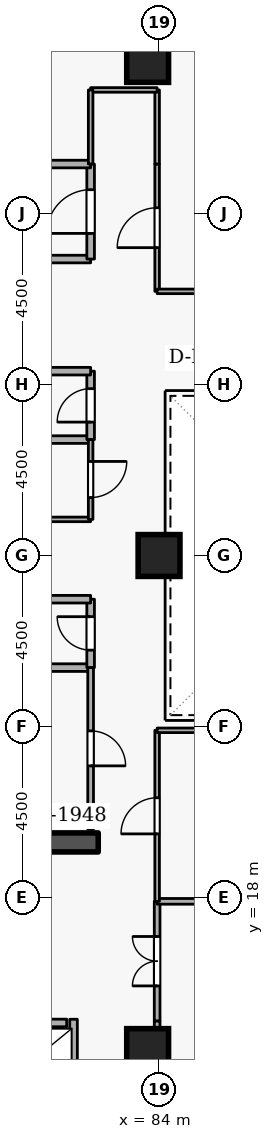
"""IFC4 building model, lengths in metres.
Left out: names, types, materials, properties, quantities, classifications, styles, units other than length and angle.
Written with IfcOpenShell. Run it as: python <this file> out.ifc"""

import sys

from ifc_helpers import new_model, si_unit, direction, frame, frame_2d, origin, origin_2d, place, context, subcontext, project, spatial, rectangle, extrude, element, fill, save


model = new_model("IFC4")
c1 = context("Model", 3, precision=1e-05, world=origin(), true_north=direction((0.0, 1.0)))
c2 = subcontext(c1, "Body", "Model", "MODEL_VIEW")
j1 = project(units=[si_unit("LENGTHUNIT", "METRE"), si_unit("PLANEANGLEUNIT", "RADIAN")], contexts=[c1])
p1 = place(None, origin())
s1 = spatial("IfcSite", under=j1, at=p1, CompositionType="ELEMENT")
p2 = place(p1, origin())
s2 = spatial("IfcBuilding", under=s1, at=p2, CompositionType="ELEMENT")
p3 = place(p2, frame((0.0, 0.0, 163.5)))
s3 = spatial("IfcBuildingStorey", under=s2, at=p3, CompositionType="ELEMENT", Elevation=163.5)
p4 = place(p3, frame((76.6, 19.45, 0.0), z_axis=(0.0, 0.0, 1.0), x_axis=(1.0, 0.0, 0.0)))
e1 = element("IfcWall", 1, at=p4, inside=s3, PredefinedType="SHEAR", context=c2, shape_type="SweptSolid", body=[
    extrude(rectangle(XDim=5.8, YDim=0.5, at=frame_2d((2.9, 0.0))), origin(), (0.0, 0.0, 1.0), 3.6),
])
for number, where, z_axis, x_axis in (
    (2, (83.7, 14.0, 0.0), (0.0, 0.0, 1.0), (1.0, 0.0, 0.0)),
    (3, (83.7, 40.0, 0.0), (0.0, 0.0, 1.0), (1.0, 0.0, 0.0)),
    (4, (84.0, 27.0, 0.0), (0.0, 0.0, 1.0), (1.0, 0.0, 0.0)),
):
    element("IfcColumn", number, at=place(p3, frame(where, z_axis=z_axis, x_axis=x_axis)), inside=s3, PredefinedType="COLUMN", context=c2, shape_type="SweptSolid", body=[
        extrude(rectangle(XDim=1.1, YDim=1.1, at=origin_2d()), origin(), (0.0, 0.0, 1.0), 3.6),
    ])
p5 = place(p3, frame((79.63, 14.7, 0.0), z_axis=(0.0, 0.0, 1.0), x_axis=(1.0, 0.0, 0.0)))
e5 = element("IfcWall", 5, at=p5, inside=s3, PredefinedType="STANDARD", context=c2, shape_type="SweptSolid", body=[
    extrude(rectangle(XDim=1.94, YDim=0.2, at=frame_2d((0.97, 0.0))), origin(), (0.0, 0.0, 1.0), 3.34),
])
p6 = place(p5, frame((0.46, 0.0, 0.0)))
e6 = element("IfcOpeningElement", 6, at=p6, cuts=e5, PredefinedType="OPENING", context=c2, shape_type="SweptSolid", body=[
    extrude(rectangle(XDim=1.02, YDim=2.06, at=frame_2d((0.51, 1.03))), frame((0.0, 0.11, 0.0), z_axis=(0.0, -1.0, 0.0), x_axis=(1.0, 0.0, 0.0)), (0.0, 0.0, 1.0), 0.22),
])
p7 = place(p3, frame((81.75, 12.612, 0.0), z_axis=(0.0, 0.0, 1.0), x_axis=(0.0, 1.0, 0.0)))
e7 = element("IfcWall", 7, at=p7, inside=s3, PredefinedType="STANDARD", context=c2, shape_type="SweptSolid", body=[
    extrude(rectangle(XDim=2.186, YDim=0.2, at=frame_2d((1.093, 0.0))), origin(), (0.0, 0.0, 1.0), 3.34),
])
p8 = place(p3, frame((79.9, 34.8, 0.0), z_axis=(0.0, 0.0, 1.0), x_axis=(1.0, 0.0, 0.0)))
e8 = element("IfcWall", 8, at=p8, inside=s3, PredefinedType="STANDARD", context=c2, shape_type="SweptSolid", body=[
    extrude(rectangle(XDim=2.3, YDim=0.2, at=frame_2d((1.15, 0.0))), origin(), (0.0, 0.0, 1.0), 2.545),
])
p9 = place(p3, frame((82.2, 34.8, 0.0), z_axis=(0.0, 0.0, 1.0), x_axis=(0.0, 1.0, 0.0)))
e9 = element("IfcWall", 9, at=p9, inside=s3, PredefinedType="STANDARD", context=c2, shape_type="SweptSolid", body=[
    extrude(rectangle(XDim=2.5, YDim=0.2, at=frame_2d((1.25, 0.0))), origin(), (0.0, 0.0, 1.0), 3.34),
])
p10 = place(p9, frame((0.675, 0.0, 0.0)))
e10 = element("IfcOpeningElement", 10, at=p10, cuts=e9, PredefinedType="OPENING", context=c2, shape_type="SweptSolid", body=[
    extrude(rectangle(XDim=1.15, YDim=2.1, at=frame_2d((0.575, 1.05))), frame((0.0, 0.11, 0.0), z_axis=(0.0, -1.0, 0.0), x_axis=(1.0, 0.0, 0.0)), (0.0, 0.0, 1.0), 0.22),
])
p11 = place(p3, frame((82.2, 37.3, 0.0), z_axis=(0.0, 0.0, 1.0), x_axis=(-1.0, 0.0, 0.0)))
e11 = element("IfcWall", 11, at=p11, inside=s3, PredefinedType="STANDARD", context=c2, shape_type="SweptSolid", body=[
    extrude(rectangle(XDim=5.7, YDim=0.2, at=frame_2d((2.85, 0.0))), origin(), (0.0, 0.0, 1.0), 3.34),
])
p12 = place(p3, frame((80.15, 24.05, 0.0), z_axis=(0.0, 0.0, 1.0), x_axis=(1.0, 0.0, 0.0)))
e12 = element("IfcWall", 12, at=p12, inside=s3, PredefinedType="STANDARD", context=c2, shape_type="SweptSolid", body=[
    extrude(rectangle(XDim=2.05, YDim=0.2, at=frame_2d((1.025, 0.0))), origin(), (0.0, 0.0, 1.0), 3.34),
])
p13 = place(p3, frame((82.2, 24.05, 0.0), z_axis=(0.0, 0.0, 1.0), x_axis=(0.0, 1.0, 0.0)))
e13 = element("IfcWall", 13, at=p13, inside=s3, PredefinedType="STANDARD", context=c2, shape_type="SweptSolid", body=[
    extrude(rectangle(XDim=1.8, YDim=0.2, at=frame_2d((0.9, 0.0))), origin(), (0.0, 0.0, 1.0), 3.34),
])
p14 = place(p13, frame((0.46, 0.0, 0.0)))
e14 = element("IfcOpeningElement", 14, at=p14, cuts=e13, PredefinedType="OPENING", context=c2, shape_type="SweptSolid", body=[
    extrude(rectangle(XDim=0.88, YDim=2.04, at=frame_2d((0.44, 1.02))), frame((0.0, 0.11, 0.0), z_axis=(0.0, -1.0, 0.0), x_axis=(1.0, 0.0, 0.0)), (0.0, 0.0, 1.0), 0.22),
])
for number, where, z_axis, x_axis in (
    (15, (82.2, 25.85, 0.0), (0.0, 0.0, 1.0), (-1.0, 0.0, 0.0)),
    (16, (80.15, 30.05, 0.0), (0.0, 0.0, 1.0), (1.0, 0.0, 0.0)),
):
    element("IfcWall", number, at=place(p3, frame(where, z_axis=z_axis, x_axis=x_axis)), inside=s3, PredefinedType="STANDARD", context=c2, shape_type="SweptSolid", body=[
        extrude(rectangle(XDim=2.05, YDim=0.2, at=frame_2d((1.025, 0.0))), origin(), (0.0, 0.0, 1.0), 3.34),
    ])
p15 = place(p3, frame((82.2, 30.05, 0.0), z_axis=(0.0, 0.0, 1.0), x_axis=(0.0, 1.0, 0.0)))
e17 = element("IfcWall", 17, at=p15, inside=s3, PredefinedType="STANDARD", context=c2, shape_type="SweptSolid", body=[
    extrude(rectangle(XDim=1.8, YDim=0.2, at=frame_2d((0.9, 0.0))), origin(), (0.0, 0.0, 1.0), 3.34),
])
p16 = place(p15, frame((0.46, 0.0, 0.0)))
e18 = element("IfcOpeningElement", 18, at=p16, cuts=e17, PredefinedType="OPENING", context=c2, shape_type="SweptSolid", body=[
    extrude(rectangle(XDim=0.88, YDim=2.04, at=frame_2d((0.44, 1.02))), frame((0.0, 0.11, 0.0), z_axis=(0.0, -1.0, 0.0), x_axis=(1.0, 0.0, 0.0)), (0.0, 0.0, 1.0), 0.22),
])
p17 = place(p3, frame((82.2, 31.85, 0.0), z_axis=(0.0, 0.0, 1.0), x_axis=(-1.0, 0.0, 0.0)))
e19 = element("IfcWall", 19, at=p17, inside=s3, PredefinedType="STANDARD", context=c2, shape_type="SweptSolid", body=[
    extrude(rectangle(XDim=2.05, YDim=0.2, at=frame_2d((1.025, 0.0))), origin(), (0.0, 0.0, 1.0), 3.34),
])
p18 = place(p3, frame((82.2, 24.05, 0.0), z_axis=(0.0, 0.0, 1.0), x_axis=(0.0, -1.0, 0.0)))
e20 = element("IfcWall", 20, at=p18, inside=s3, PredefinedType="PARTITIONING", context=c2, shape_type="SweptSolid", body=[
    extrude(rectangle(XDim=4.25, YDim=0.15, at=frame_2d((2.125, 0.0))), origin(), (0.0, 0.0, 1.0), 3.34),
])
p19 = place(p18, frame((1.665, 0.0, 0.0)))
e21 = element("IfcOpeningElement", 21, at=p19, cuts=e20, PredefinedType="OPENING", context=c2, shape_type="SweptSolid", body=[
    extrude(rectangle(XDim=0.92, YDim=2.08, at=frame_2d((0.46, 1.04))), frame((0.0, 0.085, 0.0), z_axis=(0.0, -1.0, 0.0), x_axis=(1.0, 0.0, 0.0)), (0.0, 0.0, 1.0), 0.17),
])
p20 = place(p3, frame((82.2, 27.95, 0.0), z_axis=(0.0, 0.0, 1.0), x_axis=(-1.0, 0.0, 0.0)))
e22 = element("IfcWall", 22, at=p20, inside=s3, PredefinedType="PARTITIONING", context=c2, shape_type="SweptSolid", body=[
    extrude(rectangle(XDim=2.05, YDim=0.12, at=frame_2d((1.025, 0.0))), origin(), (0.0, 0.0, 1.0), 3.34),
])
p21 = place(p3, frame((82.2, 30.05, 0.0), z_axis=(0.0, 0.0, 1.0), x_axis=(0.0, -1.0, 0.0)))
e23 = element("IfcWall", 23, at=p21, inside=s3, PredefinedType="PARTITIONING", context=c2, shape_type="SweptSolid", body=[
    extrude(rectangle(XDim=2.1, YDim=0.12, at=frame_2d((1.05, 0.0))), origin(), (0.0, 0.0, 1.0), 3.34),
])
p22 = place(p21, frame((0.575, 0.0, 0.0)))
e24 = element("IfcOpeningElement", 24, at=p22, cuts=e23, PredefinedType="OPENING", context=c2, shape_type="SweptSolid", body=[
    extrude(rectangle(XDim=0.95, YDim=2.1, at=frame_2d((0.475, 1.05))), frame((0.0, 0.07, 0.0), z_axis=(0.0, -1.0, 0.0), x_axis=(1.0, 0.0, 0.0)), (0.0, 0.0, 1.0), 0.14),
])
p23 = place(p3, frame((83.95, 14.75, 0.0), z_axis=(0.0, 0.0, 1.0), x_axis=(0.0, 1.0, 0.0)))
e25 = element("IfcWall", 25, at=p23, inside=s3, PredefinedType="PARTITIONING", context=c2, shape_type="SweptSolid", body=[
    extrude(rectangle(XDim=3.15, YDim=0.15, at=frame_2d((1.575, 0.0))), origin(), (0.0, 0.0, 1.0), 3.34),
])
p24 = place(p23, frame((0.925, 0.0, 0.0)))
e26 = element("IfcOpeningElement", 26, at=p24, cuts=e25, PredefinedType="OPENING", context=c2, shape_type="SweptSolid", body=[
    extrude(rectangle(XDim=1.3, YDim=2.12, at=frame_2d((0.65, 1.06))), frame((0.0, 0.085, 0.0), z_axis=(0.0, -1.0, 0.0), x_axis=(1.0, 0.0, 0.0)), (0.0, 0.0, 1.0), 0.17),
])
p25 = place(p3, frame((83.95, 17.9, 0.0), z_axis=(0.0, 0.0, 1.0), x_axis=(1.0, 0.0, 0.0)))
e27 = element("IfcWall", 27, at=p25, inside=s3, PredefinedType="PARTITIONING", context=c2, shape_type="SweptSolid", body=[
    extrude(rectangle(XDim=4.55, YDim=0.15, at=frame_2d((2.275, 0.0))), origin(), (0.0, 0.0, 1.0), 3.34),
])
p26 = place(p3, frame((83.95, 12.4, 0.0), z_axis=(0.0, 0.0, 1.0), x_axis=(0.0, 1.0, 0.0)))
e28 = element("IfcWall", 28, at=p26, inside=s3, PredefinedType="PARTITIONING", context=c2, shape_type="SweptSolid", body=[
    extrude(rectangle(XDim=2.35, YDim=0.15, at=frame_2d((1.175, 0.0))), origin(), (0.0, 0.0, 1.0), 3.34),
])
p27 = place(p3, frame((83.95, 17.9, 0.0), z_axis=(0.0, 0.0, 1.0), x_axis=(0.0, 1.0, 0.0)))
e29 = element("IfcWall", 29, at=p27, inside=s3, PredefinedType="PARTITIONING", context=c2, shape_type="SweptSolid", body=[
    extrude(rectangle(XDim=4.5, YDim=0.12, at=frame_2d((2.25, 0.0))), origin(), (0.0, 0.0, 1.0), 3.34),
])
p28 = place(p27, frame((1.775, 0.0, 0.0)))
e30 = element("IfcOpeningElement", 30, at=p28, cuts=e29, PredefinedType="OPENING", context=c2, shape_type="SweptSolid", body=[
    extrude(rectangle(XDim=0.95, YDim=2.1, at=frame_2d((0.475, 1.05))), frame((0.0, 0.07, 0.0), z_axis=(0.0, -1.0, 0.0), x_axis=(1.0, 0.0, 0.0)), (0.0, 0.0, 1.0), 0.14),
])
p29 = place(p3, frame((83.95, 22.4, 0.0), z_axis=(0.0, 0.0, 1.0), x_axis=(1.0, 0.0, 0.0)))
e31 = element("IfcWall", 31, at=p29, inside=s3, PredefinedType="PARTITIONING", context=c2, shape_type="SweptSolid", body=[
    extrude(rectangle(XDim=9.1, YDim=0.12, at=frame_2d((4.55, 0.0))), origin(), (0.0, 0.0, 1.0), 3.34),
])
p30 = place(p3, frame((83.95, 33.95, 0.0), z_axis=(0.0, 0.0, 1.0), x_axis=(0.0, 1.0, 0.0)))
e32 = element("IfcWall", 32, at=p30, inside=s3, PredefinedType="PARTITIONING", context=c2, shape_type="SweptSolid", body=[
    extrude(rectangle(XDim=3.35, YDim=0.12, at=frame_2d((1.675, 0.0))), origin(), (0.0, 0.0, 1.0), 3.34),
])
p31 = place(p30, frame((1.15, 0.0, 0.0)))
e33 = element("IfcOpeningElement", 33, at=p31, cuts=e32, PredefinedType="OPENING", context=c2, shape_type="SweptSolid", body=[
    extrude(rectangle(XDim=1.05, YDim=2.1, at=frame_2d((0.525, 1.05))), frame((0.0, 0.07, 0.0), z_axis=(0.0, -1.0, 0.0), x_axis=(1.0, 0.0, 0.0)), (0.0, 0.0, 1.0), 0.14),
])
p32 = place(p3, frame((83.95, 37.3, 0.0), z_axis=(0.0, 0.0, 1.0), x_axis=(0.0, 1.0, 0.0)))
e34 = element("IfcWall", 34, at=p32, inside=s3, PredefinedType="PARTITIONING", context=c2, shape_type="SweptSolid", body=[
    extrude(rectangle(XDim=1.95, YDim=0.12, at=frame_2d((0.975, 0.0))), origin(), (0.0, 0.0, 1.0), 3.34),
])
p33 = place(p3, frame((83.95, 39.25, 0.0), z_axis=(0.0, 0.0, 1.0), x_axis=(-1.0, 0.0, 0.0)))
e35 = element("IfcWall", 35, at=p33, inside=s3, PredefinedType="PARTITIONING", context=c2, shape_type="SweptSolid", body=[
    extrude(rectangle(XDim=1.75, YDim=0.12, at=frame_2d((0.875, 0.0))), origin(), (0.0, 0.0, 1.0), 3.34),
])
p34 = place(p3, frame((82.2, 39.25, 0.0), z_axis=(0.0, 0.0, 1.0), x_axis=(0.0, -1.0, 0.0)))
e36 = element("IfcWall", 36, at=p34, inside=s3, PredefinedType="PARTITIONING", context=c2, shape_type="SweptSolid", body=[
    extrude(rectangle(XDim=1.95, YDim=0.12, at=frame_2d((0.975, 0.0))), origin(), (0.0, 0.0, 1.0), 3.34),
])
p35 = place(p3, frame((86.25, 33.95, 0.0), z_axis=(0.0, 0.0, 1.0), x_axis=(-1.0, 0.0, 0.0)))
e37 = element("IfcWall", 37, at=p35, inside=s3, PredefinedType="PARTITIONING", context=c2, shape_type="SweptSolid", body=[
    extrude(rectangle(XDim=2.3, YDim=0.12, at=frame_2d((1.15, 0.0))), origin(), (0.0, 0.0, 1.0), 3.34),
])
p36 = place(p10, origin())
e38 = element("IfcDoor", 38, at=p36, inside=s3, OperationType="SINGLE_SWING_LEFT", PredefinedType="DOOR", context=c2, shape_type="SweptSolid", body=[
    extrude(rectangle(XDim=1.15, YDim=2.1, at=frame_2d((0.575, 1.05))), frame((0.0, 0.025, 0.0), z_axis=(0.0, -1.0, 0.0), x_axis=(1.0, 0.0, 0.0)), (0.0, 0.0, 1.0), 0.05),
])
fill(e10, e38)
p37 = place(p14, origin())
e39 = element("IfcDoor", 39, at=p37, inside=s3, OperationType="SINGLE_SWING_RIGHT", PredefinedType="DOOR", context=c2, shape_type="SweptSolid", body=[
    extrude(rectangle(XDim=0.88, YDim=2.04, at=frame_2d((0.44, 1.02))), frame((0.0, 0.025, 0.0), z_axis=(0.0, -1.0, 0.0), x_axis=(1.0, 0.0, 0.0)), (0.0, 0.0, 1.0), 0.05),
])
fill(e14, e39)
p38 = place(p16, origin())
e40 = element("IfcDoor", 40, at=p38, inside=s3, OperationType="SINGLE_SWING_LEFT", PredefinedType="DOOR", context=c2, shape_type="SweptSolid", body=[
    extrude(rectangle(XDim=0.88, YDim=2.04, at=frame_2d((0.44, 1.02))), frame((0.0, 0.025, 0.0), z_axis=(0.0, -1.0, 0.0), x_axis=(1.0, 0.0, 0.0)), (0.0, 0.0, 1.0), 0.05),
])
fill(e18, e40)
p39 = place(p19, origin())
e41 = element("IfcDoor", 41, at=p39, inside=s3, OperationType="SINGLE_SWING_RIGHT", PredefinedType="DOOR", context=c2, shape_type="SweptSolid", body=[
    extrude(rectangle(XDim=0.92, YDim=2.08, at=frame_2d((0.46, 1.04))), frame((0.0, 0.025, 0.0), z_axis=(0.0, -1.0, 0.0), x_axis=(1.0, 0.0, 0.0)), (0.0, 0.0, 1.0), 0.05),
])
fill(e21, e41)
p40 = place(p22, origin())
e42 = element("IfcDoor", 42, at=p40, inside=s3, OperationType="SINGLE_SWING_LEFT", PredefinedType="DOOR", context=c2, shape_type="SweptSolid", body=[
    extrude(rectangle(XDim=0.95, YDim=2.1, at=frame_2d((0.475, 1.05))), frame((0.0, 0.025, 0.0), z_axis=(0.0, -1.0, 0.0), x_axis=(1.0, 0.0, 0.0)), (0.0, 0.0, 1.0), 0.05),
])
fill(e24, e42)
p41 = place(p24, origin())
e43 = element("IfcDoor", 43, at=p41, inside=s3, OperationType="DOUBLE_DOOR_SINGLE_SWING", PredefinedType="DOOR", context=c2, shape_type="SweptSolid", body=[
    extrude(rectangle(XDim=1.3, YDim=2.12, at=frame_2d((0.65, 1.06))), frame((0.0, 0.025, 0.0), z_axis=(0.0, -1.0, 0.0), x_axis=(1.0, 0.0, 0.0)), (0.0, 0.0, 1.0), 0.05),
])
fill(e26, e43)
p42 = place(p28, origin())
e44 = element("IfcDoor", 44, at=p42, inside=s3, OperationType="SINGLE_SWING_LEFT", PredefinedType="DOOR", context=c2, shape_type="SweptSolid", body=[
    extrude(rectangle(XDim=0.95, YDim=2.1, at=frame_2d((0.475, 1.05))), frame((0.0, 0.025, 0.0), z_axis=(0.0, -1.0, 0.0), x_axis=(1.0, 0.0, 0.0)), (0.0, 0.0, 1.0), 0.05),
])
fill(e30, e44)
p43 = place(p31, origin())
e45 = element("IfcDoor", 45, at=p43, inside=s3, OperationType="SINGLE_SWING_LEFT", PredefinedType="DOOR", context=c2, shape_type="SweptSolid", body=[
    extrude(rectangle(XDim=1.05, YDim=2.1, at=frame_2d((0.525, 1.05))), frame((0.0, 0.025, 0.0), z_axis=(0.0, -1.0, 0.0), x_axis=(1.0, 0.0, 0.0)), (0.0, 0.0, 1.0), 0.05),
])
fill(e33, e45)
save(model, sys.argv[1])
